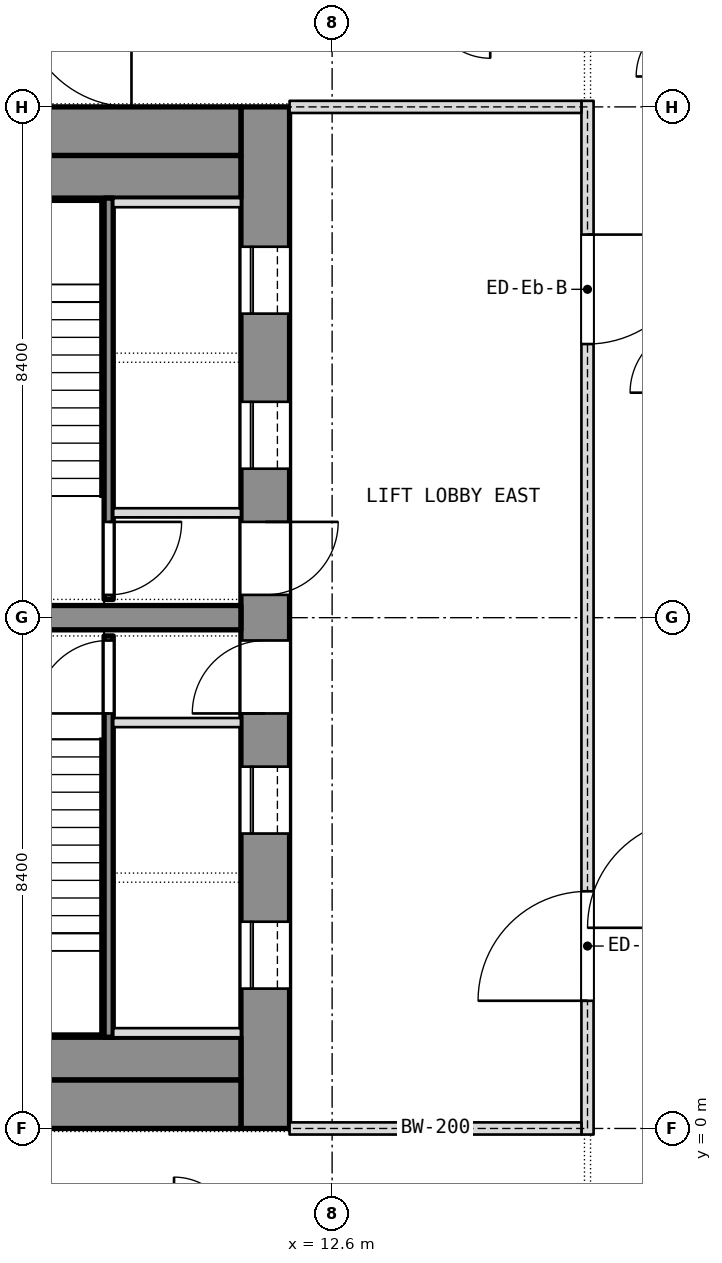
"""IFC4 building model, lengths in metres.
Left out: names, types, materials, properties, quantities, classifications, styles, units other than length and angle.
Written with IfcOpenShell. Run it as: python <this file> out.ifc"""

import sys

from ifc_helpers import new_model, si_unit, direction, frame, frame_2d, origin, place, context, subcontext, project, spatial, rectangle, extrude, element, fill, save


model = new_model("IFC4")
c1 = context("Model", 3, precision=1e-05, world=origin(), true_north=direction((0.0, 1.0)))
c2 = subcontext(c1, "Body", "Model", "MODEL_VIEW")
j1 = project(units=[si_unit("LENGTHUNIT", "METRE"), si_unit("PLANEANGLEUNIT", "RADIAN")], contexts=[c1])
p1 = place(None, origin())
s1 = spatial("IfcSite", under=j1, at=p1, CompositionType="ELEMENT")
p2 = place(p1, origin())
s2 = spatial("IfcBuilding", under=s1, at=p2, CompositionType="ELEMENT")
p3 = place(p2, frame((0.0, 0.0, 223.7)))
s3 = spatial("IfcBuildingStorey", under=s2, at=p3, CompositionType="ELEMENT", Elevation=223.7)
p4 = place(p3, frame((11.5, 0.0, 0.0), z_axis=(0.0, 0.0, 1.0), x_axis=(0.0, 1.0, 0.0)))
e1 = element("IfcWall", 1, at=p4, inside=s3, PredefinedType="SHEAR", context=c2, shape_type="SweptSolid", body=[
    extrude(rectangle(XDim=16.8, YDim=0.8, at=frame_2d((8.4, 0.0))), origin(), (0.0, 0.0, 1.0), 3.6),
])
p5 = place(p4, frame((2.3, 0.0, 0.0)))
e2 = element("IfcOpeningElement", 2, at=p5, cuts=e1, PredefinedType="OPENING", context=c2, shape_type="SweptSolid", body=[
    extrude(rectangle(XDim=1.1, YDim=2.1, at=frame_2d((0.55, 1.05))), frame((0.0, 0.4, 0.0), z_axis=(0.0, -1.0, 0.0), x_axis=(1.0, 0.0, 0.0)), (0.0, 0.0, 1.0), 0.8),
])
p6 = place(p4, frame((4.85, 0.0, 0.0)))
e3 = element("IfcOpeningElement", 3, at=p6, cuts=e1, PredefinedType="OPENING", context=c2, shape_type="SweptSolid", body=[
    extrude(rectangle(XDim=1.1, YDim=2.1, at=frame_2d((0.55, 1.05))), frame((0.0, 0.4, 0.0), z_axis=(0.0, -1.0, 0.0), x_axis=(1.0, 0.0, 0.0)), (0.0, 0.0, 1.0), 0.8),
])
p7 = place(p4, frame((6.825, 0.0, 0.0)))
e4 = element("IfcOpeningElement", 4, at=p7, cuts=e1, PredefinedType="OPENING", context=c2, shape_type="SweptSolid", body=[
    extrude(rectangle(XDim=1.2, YDim=2.1, at=frame_2d((0.6, 1.05))), frame((0.0, 0.4, 0.0), z_axis=(0.0, -1.0, 0.0), x_axis=(1.0, 0.0, 0.0)), (0.0, 0.0, 1.0), 0.8),
])
p8 = place(p4, frame((13.4, 0.0, 0.0)))
e5 = element("IfcOpeningElement", 5, at=p8, cuts=e1, PredefinedType="OPENING", context=c2, shape_type="SweptSolid", body=[
    extrude(rectangle(XDim=1.1, YDim=2.1, at=frame_2d((0.55, 1.05))), frame((0.0, 0.4, 0.0), z_axis=(0.0, -1.0, 0.0), x_axis=(1.0, 0.0, 0.0)), (0.0, 0.0, 1.0), 0.8),
])
p9 = place(p4, frame((10.85, 0.0, 0.0)))
e6 = element("IfcOpeningElement", 6, at=p9, cuts=e1, PredefinedType="OPENING", context=c2, shape_type="SweptSolid", body=[
    extrude(rectangle(XDim=1.1, YDim=2.1, at=frame_2d((0.55, 1.05))), frame((0.0, 0.4, 0.0), z_axis=(0.0, -1.0, 0.0), x_axis=(1.0, 0.0, 0.0)), (0.0, 0.0, 1.0), 0.8),
])
p10 = place(p4, frame((8.775, 0.0, 0.0)))
e7 = element("IfcOpeningElement", 7, at=p10, cuts=e1, PredefinedType="OPENING", context=c2, shape_type="SweptSolid", body=[
    extrude(rectangle(XDim=1.2, YDim=2.1, at=frame_2d((0.6, 1.05))), frame((0.0, 0.4, 0.0), z_axis=(0.0, -1.0, 0.0), x_axis=(1.0, 0.0, 0.0)), (0.0, 0.0, 1.0), 0.8),
])
for number, where, z_axis, x_axis in (
    (8, (-11.1, 0.4, 0.0), (0.0, 0.0, 1.0), (1.0, 0.0, 0.0)),
    (9, (-11.1, 16.4, 0.0), (0.0, 0.0, 1.0), (1.0, 0.0, 0.0)),
):
    element("IfcWall", number, at=place(p3, frame(where, z_axis=z_axis, x_axis=x_axis)), inside=s3, PredefinedType="SHEAR", context=c2, shape_type="SweptSolid", body=[
        extrude(rectangle(XDim=22.2, YDim=0.8, at=frame_2d((11.1, 0.0))), origin(), (0.0, 0.0, 1.0), 3.6),
    ])
p11 = place(p3, frame((4.4, 8.4, 0.0), z_axis=(0.0, 0.0, 1.0), x_axis=(1.0, 0.0, 0.0)))
e10 = element("IfcWall", 10, at=p11, inside=s3, PredefinedType="SHEAR", context=c2, shape_type="SweptSolid", body=[
    extrude(rectangle(XDim=6.7, YDim=0.4, at=frame_2d((3.35, 0.0))), origin(), (0.0, 0.0, 1.0), 3.6),
])
for number, where, z_axis, x_axis in (
    (11, (-11.1, 1.15, 0.0), (0.0, 0.0, 1.0), (1.0, 0.0, 0.0)),
    (12, (-11.1, 15.65, 0.0), (0.0, 0.0, 1.0), (1.0, 0.0, 0.0)),
):
    element("IfcWall", number, at=place(p3, frame(where, z_axis=z_axis, x_axis=x_axis)), inside=s3, PredefinedType="PARTITIONING", context=c2, shape_type="SweptSolid", body=[
        extrude(rectangle(XDim=22.2, YDim=0.7, at=frame_2d((11.1, 0.0))), origin(), (0.0, 0.0, 1.0), 3.34),
    ])
p12 = place(p3, frame((8.925, 1.5, 0.0), z_axis=(0.0, 0.0, 1.0), x_axis=(0.0, 1.0, 0.0)))
e13 = element("IfcWall", 13, at=p12, inside=s3, PredefinedType="SHEAR", context=c2, shape_type="SweptSolid", body=[
    extrude(rectangle(XDim=6.6, YDim=0.15, at=frame_2d((3.3, 0.0))), origin(), (0.0, 0.0, 1.0), 3.34),
])
p13 = place(p12, frame((5.325, 0.0, 0.0)))
e14 = element("IfcOpeningElement", 14, at=p13, cuts=e13, PredefinedType="OPENING", context=c2, shape_type="SweptSolid", body=[
    extrude(rectangle(XDim=1.2, YDim=2.1, at=frame_2d((0.6, 1.05))), frame((0.0, 0.075, 0.0), z_axis=(0.0, -1.0, 0.0), x_axis=(1.0, 0.0, 0.0)), (0.0, 0.0, 1.0), 0.15),
])
for number, where, z_axis, x_axis in (
    (15, (9.0, 6.675, 0.0), (0.0, 0.0, 1.0), (1.0, 0.0, 0.0)),
    (16, (9.0, 1.575, 0.0), (0.0, 0.0, 1.0), (1.0, 0.0, 0.0)),
):
    element("IfcWall", number, at=place(p3, frame(where, z_axis=z_axis, x_axis=x_axis)), inside=s3, PredefinedType="SHEAR", context=c2, shape_type="SweptSolid", body=[
        extrude(rectangle(XDim=2.1, YDim=0.15, at=frame_2d((1.05, 0.0))), origin(), (0.0, 0.0, 1.0), 3.6),
    ])
p14 = place(p3, frame((8.925, 8.7, 0.0), z_axis=(0.0, 0.0, 1.0), x_axis=(0.0, 1.0, 0.0)))
e17 = element("IfcWall", 17, at=p14, inside=s3, PredefinedType="SHEAR", context=c2, shape_type="SweptSolid", body=[
    extrude(rectangle(XDim=6.6, YDim=0.15, at=frame_2d((3.3, 0.0))), origin(), (0.0, 0.0, 1.0), 3.34),
])
p15 = place(p14, frame((0.075, 0.0, 0.0)))
e18 = element("IfcOpeningElement", 18, at=p15, cuts=e17, PredefinedType="OPENING", context=c2, shape_type="SweptSolid", body=[
    extrude(rectangle(XDim=1.2, YDim=2.1, at=frame_2d((0.6, 1.05))), frame((0.0, 0.075, 0.0), z_axis=(0.0, -1.0, 0.0), x_axis=(1.0, 0.0, 0.0)), (0.0, 0.0, 1.0), 0.15),
])
for number, where, z_axis, x_axis in (
    (19, (9.0, 10.125, 0.0), (0.0, 0.0, 1.0), (1.0, 0.0, 0.0)),
    (20, (9.0, 15.225, 0.0), (0.0, 0.0, 1.0), (1.0, 0.0, 0.0)),
):
    element("IfcWall", number, at=place(p3, frame(where, z_axis=z_axis, x_axis=x_axis)), inside=s3, PredefinedType="SHEAR", context=c2, shape_type="SweptSolid", body=[
        extrude(rectangle(XDim=2.1, YDim=0.15, at=frame_2d((1.05, 0.0))), origin(), (0.0, 0.0, 1.0), 3.6),
    ])
p16 = place(p3, frame((16.8, -0.1, 0.0), z_axis=(0.0, 0.0, 1.0), x_axis=(0.0, 1.0, 0.0)))
e21 = element("IfcWall", 21, at=p16, inside=s3, PredefinedType="PARTITIONING", context=c2, shape_type="SweptSolid", body=[
    extrude(rectangle(XDim=17.0, YDim=0.2, at=frame_2d((8.5, 0.0))), origin(), (0.0, 0.0, 1.0), 3.34),
])
p17 = place(p16, frame((2.2, 0.0, 0.0)))
e22 = element("IfcOpeningElement", 22, at=p17, cuts=e21, PredefinedType="OPENING", context=c2, shape_type="SweptSolid", body=[
    extrude(rectangle(XDim=1.8, YDim=2.1, at=frame_2d((0.9, 1.05))), frame((0.0, 0.1, 0.0), z_axis=(0.0, -1.0, 0.0), x_axis=(1.0, 0.0, 0.0)), (0.0, 0.0, 1.0), 0.2),
])
p18 = place(p16, frame((13.0, 0.0, 0.0)))
e23 = element("IfcOpeningElement", 23, at=p18, cuts=e21, PredefinedType="OPENING", context=c2, shape_type="SweptSolid", body=[
    extrude(rectangle(XDim=1.8, YDim=2.1, at=frame_2d((0.9, 1.05))), frame((0.0, 0.1, 0.0), z_axis=(0.0, -1.0, 0.0), x_axis=(1.0, 0.0, 0.0)), (0.0, 0.0, 1.0), 0.2),
])
for number, where, z_axis, x_axis in (
    (24, (11.9, 0.0, 0.0), (0.0, 0.0, 1.0), (1.0, 0.0, 0.0)),
    (25, (11.9, 16.8, 0.0), (0.0, 0.0, 1.0), (1.0, 0.0, 0.0)),
):
    element("IfcWall", number, at=place(p3, frame(where, z_axis=z_axis, x_axis=x_axis)), inside=s3, PredefinedType="PARTITIONING", context=c2, shape_type="SweptSolid", body=[
        extrude(rectangle(XDim=4.8, YDim=0.2, at=frame_2d((2.4, 0.0))), origin(), (0.0, 0.0, 1.0), 2.94),
    ])
p19 = place(p5, origin())
e26 = element("IfcDoor", 26, at=p19, inside=s3, OperationType="SLIDING_TO_LEFT", PredefinedType="DOOR", context=c2, shape_type="SweptSolid", body=[
    extrude(rectangle(XDim=1.1, YDim=2.1, at=frame_2d((0.55, 1.05))), frame((0.0, 0.025, 0.0), z_axis=(0.0, -1.0, 0.0), x_axis=(1.0, 0.0, 0.0)), (0.0, 0.0, 1.0), 0.05),
])
fill(e2, e26)
p20 = place(p6, origin())
e27 = element("IfcDoor", 27, at=p20, inside=s3, OperationType="SLIDING_TO_LEFT", PredefinedType="DOOR", context=c2, shape_type="SweptSolid", body=[
    extrude(rectangle(XDim=1.1, YDim=2.1, at=frame_2d((0.55, 1.05))), frame((0.0, 0.025, 0.0), z_axis=(0.0, -1.0, 0.0), x_axis=(1.0, 0.0, 0.0)), (0.0, 0.0, 1.0), 0.05),
])
fill(e3, e27)
p21 = place(p7, origin())
e28 = element("IfcDoor", 28, at=p21, inside=s3, OperationType="SINGLE_SWING_LEFT", PredefinedType="DOOR", context=c2, shape_type="SweptSolid", body=[
    extrude(rectangle(XDim=1.2, YDim=2.1, at=frame_2d((0.6, 1.05))), frame((0.0, 0.025, 0.0), z_axis=(0.0, -1.0, 0.0), x_axis=(1.0, 0.0, 0.0)), (0.0, 0.0, 1.0), 0.05),
])
fill(e4, e28)
p22 = place(p13, origin())
e29 = element("IfcDoor", 29, at=p22, inside=s3, OperationType="SINGLE_SWING_LEFT", PredefinedType="DOOR", context=c2, shape_type="SweptSolid", body=[
    extrude(rectangle(XDim=1.2, YDim=2.1, at=frame_2d((0.6, 1.05))), frame((0.0, 0.025, 0.0), z_axis=(0.0, -1.0, 0.0), x_axis=(1.0, 0.0, 0.0)), (0.0, 0.0, 1.0), 0.05),
])
fill(e14, e29)
p23 = place(p8, origin())
e30 = element("IfcDoor", 30, at=p23, inside=s3, OperationType="SLIDING_TO_LEFT", PredefinedType="DOOR", context=c2, shape_type="SweptSolid", body=[
    extrude(rectangle(XDim=1.1, YDim=2.1, at=frame_2d((0.55, 1.05))), frame((0.0, 0.025, 0.0), z_axis=(0.0, -1.0, 0.0), x_axis=(1.0, 0.0, 0.0)), (0.0, 0.0, 1.0), 0.05),
])
fill(e5, e30)
p24 = place(p9, origin())
e31 = element("IfcDoor", 31, at=p24, inside=s3, OperationType="SLIDING_TO_LEFT", PredefinedType="DOOR", context=c2, shape_type="SweptSolid", body=[
    extrude(rectangle(XDim=1.1, YDim=2.1, at=frame_2d((0.55, 1.05))), frame((0.0, 0.025, 0.0), z_axis=(0.0, -1.0, 0.0), x_axis=(1.0, 0.0, 0.0)), (0.0, 0.0, 1.0), 0.05),
])
fill(e6, e31)
p25 = place(p10, origin())
e32 = element("IfcDoor", 32, at=p25, inside=s3, OperationType="SINGLE_SWING_LEFT", PredefinedType="DOOR", context=c2, shape_type="SweptSolid", body=[
    extrude(rectangle(XDim=1.2, YDim=2.1, at=frame_2d((0.6, 1.05))), frame((0.0, 0.025, 0.0), z_axis=(0.0, -1.0, 0.0), x_axis=(1.0, 0.0, 0.0)), (0.0, 0.0, 1.0), 0.05),
])
fill(e7, e32)
p26 = place(p15, origin())
e33 = element("IfcDoor", 33, at=p26, inside=s3, OperationType="SINGLE_SWING_LEFT", PredefinedType="DOOR", context=c2, shape_type="SweptSolid", body=[
    extrude(rectangle(XDim=1.2, YDim=2.1, at=frame_2d((0.6, 1.05))), frame((0.0, 0.025, 0.0), z_axis=(0.0, -1.0, 0.0), x_axis=(1.0, 0.0, 0.0)), (0.0, 0.0, 1.0), 0.05),
])
fill(e18, e33)
p27 = place(p17, origin())
e34 = element("IfcDoor", 34, at=p27, inside=s3, OperationType="DOUBLE_DOOR_SINGLE_SWING", PredefinedType="DOOR", context=c2, shape_type="SweptSolid", body=[
    extrude(rectangle(XDim=1.8, YDim=2.1, at=frame_2d((0.9, 1.05))), frame((0.0, 0.025, 0.0), z_axis=(0.0, -1.0, 0.0), x_axis=(1.0, 0.0, 0.0)), (0.0, 0.0, 1.0), 0.05),
])
fill(e22, e34)
p28 = place(p18, origin())
e35 = element("IfcDoor", 35, at=p28, inside=s3, OperationType="DOUBLE_DOOR_SINGLE_SWING", PredefinedType="DOOR", context=c2, shape_type="SweptSolid", body=[
    extrude(rectangle(XDim=1.8, YDim=2.1, at=frame_2d((0.9, 1.05))), frame((0.0, 0.025, 0.0), z_axis=(0.0, -1.0, 0.0), x_axis=(1.0, 0.0, 0.0)), (0.0, 0.0, 1.0), 0.05),
])
fill(e23, e35)
save(model, sys.argv[1])
